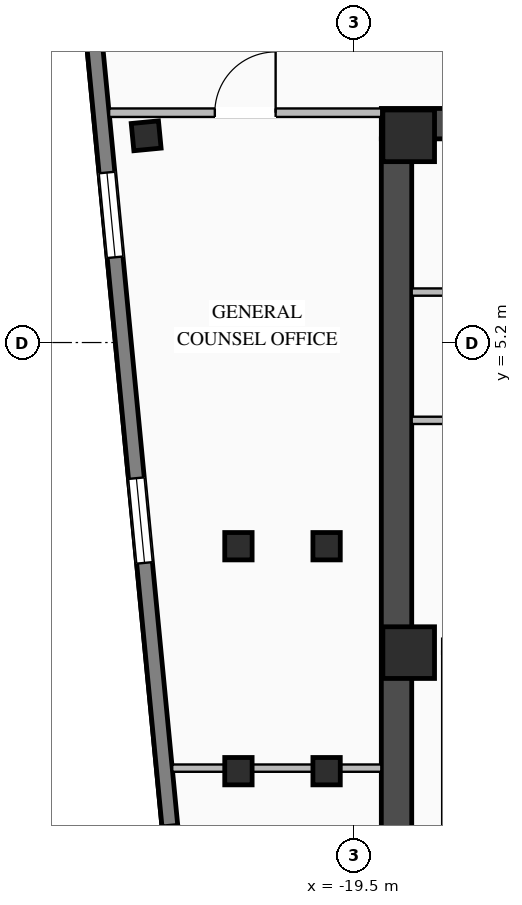
"""IFC4 building model, lengths in metres.
Left out: names, types, materials, properties, quantities, classifications, styles, units other than length and angle.
Written with IfcOpenShell. Run it as: python <this file> out.ifc"""

import sys

from ifc_helpers import new_model, si_unit, direction, frame, frame_2d, origin, origin_2d, place, context, subcontext, project, spatial, rectangle, i_section, extrude, element, fill, save


model = new_model("IFC4")
c1 = context("Model", 3, precision=1e-05, world=origin(), true_north=direction((0.0, 1.0)))
c2 = subcontext(c1, "Body", "Model", "MODEL_VIEW")
j1 = project(units=[si_unit("LENGTHUNIT", "METRE"), si_unit("PLANEANGLEUNIT", "RADIAN")], contexts=[c1])
p1 = place(None, origin())
s1 = spatial("IfcSite", under=j1, at=p1, CompositionType="ELEMENT")
p2 = place(p1, origin())
s2 = spatial("IfcBuilding", under=s1, at=p2, CompositionType="ELEMENT")
p3 = place(p2, frame((0.0, 0.0, 272.4)))
s3 = spatial("IfcBuildingStorey", under=s2, at=p3, CompositionType="ELEMENT", Elevation=272.4)
p4 = place(p3, frame((-19.05, 8.8, 0.0), z_axis=(0.0, 0.0, 1.0), x_axis=(1.0, 0.0, 0.0)))
e1 = element("IfcWall", 1, at=p4, inside=s3, PredefinedType="SHEAR", context=c2, shape_type="SweptSolid", body=[
    extrude(rectangle(XDim=10.25, YDim=0.5, at=frame_2d((5.125, 0.0))), origin(), (0.0, 0.0, 1.0), 3.27),
])
p5 = place(p4, frame((5.6, 0.0, 0.0)))
e2 = element("IfcOpeningElement", 2, at=p5, cuts=e1, PredefinedType="OPENING", context=c2, shape_type="SweptSolid", body=[
    extrude(rectangle(XDim=1.4, YDim=2.05, at=frame_2d((0.7, 1.025))), frame((0.0, 0.26, 0.0), z_axis=(0.0, -1.0, 0.0), x_axis=(1.0, 0.0, 0.0)), (0.0, 0.0, 1.0), 0.52),
])
p6 = place(p3, frame((-18.8, -8.55, 0.0), z_axis=(0.0, 0.0, 1.0), x_axis=(0.0, 1.0, 0.0)))
e3 = element("IfcWall", 3, at=p6, inside=s3, PredefinedType="SHEAR", context=c2, shape_type="SweptSolid", body=[
    extrude(rectangle(XDim=17.1, YDim=0.5, at=frame_2d((8.55, 0.0))), origin(), (0.0, 0.0, 1.0), 3.27),
])
for number, where, z_axis, x_axis in (
    (4, (-18.6, 0.1, 0.0), (0.0, 0.0, 1.0), (1.0, 0.0, 0.0)),
    (5, (-18.6, 8.6, 0.0), (0.0, 0.0, 1.0), (1.0, 0.0, 0.0)),
):
    element("IfcColumn", number, at=place(p3, frame(where, z_axis=z_axis, x_axis=x_axis)), inside=s3, PredefinedType="COLUMN", context=c2, shape_type="SweptSolid", body=[
        extrude(rectangle(XDim=0.85, YDim=0.85, at=origin_2d()), origin(), (0.0, 0.0, 1.0), 3.45),
    ])
for number, where, z_axis, x_axis in (
    (6, (-21.4, -1.85, 0.0), (0.0, 0.0, 1.0), (1.0, 0.0, 0.0)),
    (7, (-21.4, 1.85, 0.0), (0.0, 0.0, 1.0), (1.0, 0.0, 0.0)),
    (8, (-19.95, -1.85, 0.0), (0.0, 0.0, 1.0), (1.0, 0.0, 0.0)),
    (9, (-19.95, 1.85, 0.0), (0.0, 0.0, 1.0), (1.0, 0.0, 0.0)),
    (10, (-22.917, 8.6, 0.0), (0.0, 0.0, 1.0), (0.995, 0.096, 0.0)),
):
    element("IfcColumn", number, at=place(p3, frame(where, z_axis=z_axis, x_axis=x_axis)), inside=s3, PredefinedType="COLUMN", context=c2, shape_type="SweptSolid", body=[
        extrude(i_section(OverallWidth=0.45, OverallDepth=0.45, WebThickness=0.022, FlangeThickness=0.032, at=origin_2d()), origin(), (0.0, 0.0, 1.0), 3.45),
    ])
p7 = place(p3, frame((-22.527, -2.754, 0.0), z_axis=(0.0, 0.0, 1.0), x_axis=(-0.095850890337, 0.995395703638, 0.0)))
e11 = element("IfcWall", 11, at=p7, inside=s3, PredefinedType="STANDARD", context=c2, shape_type="SweptSolid", body=[
    extrude(rectangle(XDim=15.15, YDim=0.26, at=frame_2d((7.575, 0.0))), origin(), (0.0, 0.0, 1.0), 3.25),
])
p8 = place(p7, frame((4.35, 0.0, 0.76)))
e12 = element("IfcOpeningElement", 12, at=p8, cuts=e11, PredefinedType="OPENING", context=c2, shape_type="SweptSolid", body=[
    extrude(rectangle(XDim=1.4, YDim=1.95, at=frame_2d((0.7, 0.975))), frame((0.0, 0.14, 0.0), z_axis=(0.0, -1.0, 0.0), x_axis=(1.0, 0.0, 0.0)), (0.0, 0.0, 1.0), 0.28),
])
p9 = place(p7, frame((9.4, 0.0, 0.76)))
e13 = element("IfcOpeningElement", 13, at=p9, cuts=e11, PredefinedType="OPENING", context=c2, shape_type="SweptSolid", body=[
    extrude(rectangle(XDim=1.4, YDim=1.95, at=frame_2d((0.7, 0.975))), frame((0.0, 0.14, 0.0), z_axis=(0.0, -1.0, 0.0), x_axis=(1.0, 0.0, 0.0)), (0.0, 0.0, 1.0), 0.28),
])
p10 = place(p3, frame((-18.55, 3.92, 0.0), z_axis=(0.0, 0.0, 1.0), x_axis=(1.0, 0.0, 0.0)))
e14 = element("IfcWall", 14, at=p10, inside=s3, PredefinedType="STANDARD", context=c2, shape_type="SweptSolid", body=[
    extrude(rectangle(XDim=4.65, YDim=0.12, at=frame_2d((2.325, 0.0))), origin(), (0.0, 0.0, 1.0), 3.25),
])
p11 = place(p3, frame((-18.55, 6.03, 0.0), z_axis=(0.0, 0.0, 1.0), x_axis=(1.0, 0.0, 0.0)))
e15 = element("IfcWall", 15, at=p11, inside=s3, PredefinedType="STANDARD", context=c2, shape_type="SweptSolid", body=[
    extrude(rectangle(XDim=2.4, YDim=0.12, at=frame_2d((1.2, 0.0))), origin(), (0.0, 0.0, 1.0), 3.25),
])
p12 = place(p3, frame((-23.527, 8.98, 0.0), z_axis=(0.0, 0.0, 1.0), x_axis=(1.0, 0.0, 0.0)))
e16 = element("IfcWall", 16, at=p12, inside=s3, PredefinedType="STANDARD", context=c2, shape_type="SweptSolid", body=[
    extrude(rectangle(XDim=4.477, YDim=0.14, at=frame_2d((2.238, 0.0))), origin(), (0.0, 0.0, 1.0), 3.25),
])
p13 = place(p12, frame((1.738, 0.0, 0.0)))
e17 = element("IfcOpeningElement", 17, at=p13, cuts=e16, PredefinedType="OPENING", context=c2, shape_type="SweptSolid", body=[
    extrude(rectangle(XDim=1.0, YDim=2.08, at=frame_2d((0.5, 1.04))), frame((0.0, 0.08, 0.0), z_axis=(0.0, -1.0, 0.0), x_axis=(1.0, 0.0, 0.0)), (0.0, 0.0, 1.0), 0.16),
])
p14 = place(p3, frame((-22.489, -1.8, 0.0), z_axis=(0.0, 0.0, 1.0), x_axis=(1.0, 0.0, 0.0)))
e18 = element("IfcWall", 18, at=p14, inside=s3, PredefinedType="STANDARD", context=c2, shape_type="SweptSolid", body=[
    extrude(rectangle(XDim=3.438, YDim=0.12, at=frame_2d((1.719, 0.0))), origin(), (0.0, 0.0, 1.0), 3.25),
])
p15 = place(p8, origin())
e19 = element("IfcWindow", 19, at=p15, inside=s3, PartitioningType="SINGLE_PANEL", PredefinedType="WINDOW", context=c2, shape_type="SweptSolid", body=[
    extrude(rectangle(XDim=1.4, YDim=1.95, at=frame_2d((0.7, 0.975))), frame((0.0, 0.03, 0.0), z_axis=(0.0, -1.0, 0.0), x_axis=(1.0, 0.0, 0.0)), (0.0, 0.0, 1.0), 0.06),
])
fill(e12, e19)
p16 = place(p9, origin())
e20 = element("IfcWindow", 20, at=p16, inside=s3, PartitioningType="SINGLE_PANEL", PredefinedType="WINDOW", context=c2, shape_type="SweptSolid", body=[
    extrude(rectangle(XDim=1.4, YDim=1.95, at=frame_2d((0.7, 0.975))), frame((0.0, 0.03, 0.0), z_axis=(0.0, -1.0, 0.0), x_axis=(1.0, 0.0, 0.0)), (0.0, 0.0, 1.0), 0.06),
])
fill(e13, e20)
p17 = place(p13, origin())
e21 = element("IfcDoor", 21, at=p17, inside=s3, OperationType="SINGLE_SWING_RIGHT", PredefinedType="DOOR", context=c2, shape_type="SweptSolid", body=[
    extrude(rectangle(XDim=1.0, YDim=2.08, at=frame_2d((0.5, 1.04))), frame((0.0, 0.025, 0.0), z_axis=(0.0, -1.0, 0.0), x_axis=(1.0, 0.0, 0.0)), (0.0, 0.0, 1.0), 0.05),
])
fill(e17, e21)
save(model, sys.argv[1])
